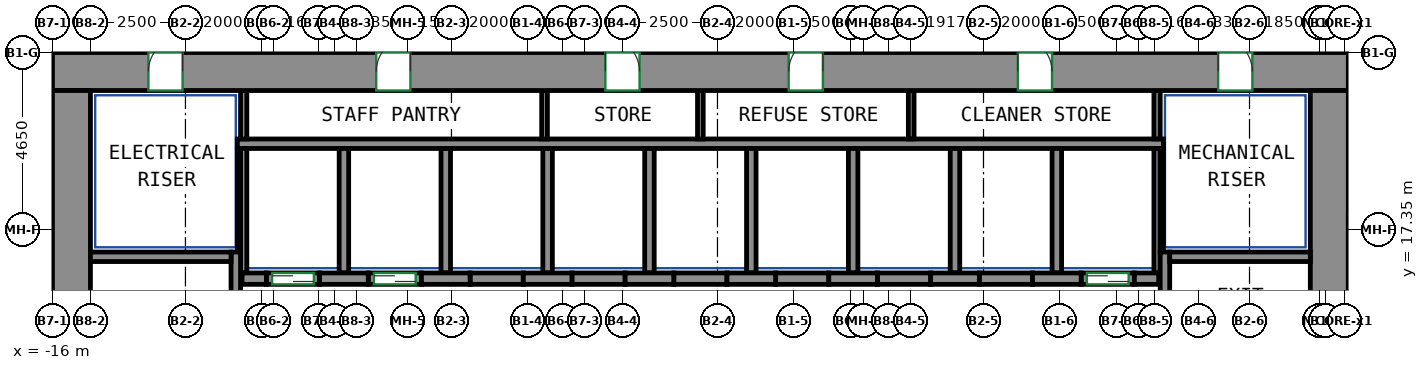
"""IFC4 building model, lengths in metres.
Left out: names, types, materials, properties, quantities, classifications, styles, units other than length and angle.
Written with IfcOpenShell. Run it as: python <this file> out.ifc"""

import sys

from ifc_helpers import new_model, si_unit, direction, frame, frame_2d, origin, place, context, subcontext, project, spatial, rectangle, extrude, source, transform, mapped, element, fill, save


model = new_model("IFC4")
c1 = context("Model", 3, precision=1e-05, world=origin(), true_north=direction((0.0, 1.0)))
c2 = subcontext(c1, "Body", "Model", "MODEL_VIEW")
j1 = project(units=[si_unit("LENGTHUNIT", "METRE"), si_unit("PLANEANGLEUNIT", "RADIAN")], contexts=[c1])
p1 = place(None, origin())
s1 = spatial("IfcSite", under=j1, at=p1, CompositionType="ELEMENT")
p2 = place(p1, origin())
s2 = spatial("IfcBuilding", under=s1, at=p2, CompositionType="ELEMENT")
p3 = place(p2, frame((0.0, 0.0, 79.2)))
s3 = spatial("IfcBuildingStorey", under=s2, at=p3, CompositionType="ELEMENT", Elevation=79.2)
m1 = source(origin(), c2, "Body", "SweptSolid", [
    extrude(rectangle(XDim=34.1, YDim=1.0, at=frame_2d((17.05, 0.0))), origin(), (0.0, 0.0, 1.0), 3.72),
])
p4 = place(p3, frame((-16.0, 21.5, 0.0), z_axis=(0.0, 0.0, 1.0), x_axis=(1.0, 0.0, 0.0)))
e1 = element("IfcWall", 1, at=p4, inside=s3, PredefinedType="SHEAR", context=c2, shape_type="MappedRepresentation", body=[
    mapped(m1, transform((0.0, 0.0, 0.0))),
])
p5 = place(p4, frame((8.52, 0.0, 0.0)))
e2 = element("IfcOpeningElement", 2, at=p5, cuts=e1, PredefinedType="OPENING", context=c2, shape_type="SweptSolid", body=[
    extrude(rectangle(XDim=0.9, YDim=2.1, at=frame_2d((0.45, 1.05))), frame((0.0, 0.51, 0.0), z_axis=(0.0, -1.0, 0.0), x_axis=(1.0, 0.0, 0.0)), (0.0, 0.0, 1.0), 1.02),
])
p6 = place(p4, frame((14.55, 0.0, 0.0)))
e3 = element("IfcOpeningElement", 3, at=p6, cuts=e1, PredefinedType="OPENING", context=c2, shape_type="SweptSolid", body=[
    extrude(rectangle(XDim=0.9, YDim=2.1, at=frame_2d((0.45, 1.05))), frame((0.0, 0.51, 0.0), z_axis=(0.0, -1.0, 0.0), x_axis=(1.0, 0.0, 0.0)), (0.0, 0.0, 1.0), 1.02),
])
p7 = place(p4, frame((19.374, 0.0, 0.0)))
e4 = element("IfcOpeningElement", 4, at=p7, cuts=e1, PredefinedType="OPENING", context=c2, shape_type="SweptSolid", body=[
    extrude(rectangle(XDim=0.9, YDim=2.1, at=frame_2d((0.45, 1.05))), frame((0.0, 0.51, 0.0), z_axis=(0.0, -1.0, 0.0), x_axis=(1.0, 0.0, 0.0)), (0.0, 0.0, 1.0), 1.02),
])
p8 = place(p4, frame((25.404, 0.0, 0.0)))
e5 = element("IfcOpeningElement", 5, at=p8, cuts=e1, PredefinedType="OPENING", context=c2, shape_type="SweptSolid", body=[
    extrude(rectangle(XDim=0.9, YDim=2.1, at=frame_2d((0.45, 1.05))), frame((0.0, 0.51, 0.0), z_axis=(0.0, -1.0, 0.0), x_axis=(1.0, 0.0, 0.0)), (0.0, 0.0, 1.0), 1.02),
])
p9 = place(p4, frame((2.525, 0.0, 0.0)))
e6 = element("IfcOpeningElement", 6, at=p9, cuts=e1, PredefinedType="OPENING", context=c2, shape_type="SweptSolid", body=[
    extrude(rectangle(XDim=0.9, YDim=2.1, at=frame_2d((0.45, 1.05))), frame((0.0, 0.51, 0.0), z_axis=(0.0, -1.0, 0.0), x_axis=(1.0, 0.0, 0.0)), (0.0, 0.0, 1.0), 1.02),
])
p10 = place(p4, frame((30.675, 0.0, 0.0)))
e7 = element("IfcOpeningElement", 7, at=p10, cuts=e1, PredefinedType="OPENING", context=c2, shape_type="SweptSolid", body=[
    extrude(rectangle(XDim=0.9, YDim=2.1, at=frame_2d((0.45, 1.05))), frame((0.0, 0.51, 0.0), z_axis=(0.0, -1.0, 0.0), x_axis=(1.0, 0.0, 0.0)), (0.0, 0.0, 1.0), 1.02),
])
m2 = source(origin(), c2, "Body", "SweptSolid", [
    extrude(rectangle(XDim=12.0, YDim=1.0, at=frame_2d((6.0, 0.0))), origin(), (0.0, 0.0, 1.0), 3.72),
])
for number, where, z_axis, x_axis in (
    (8, (-15.5, 9.0, 0.0), (0.0, 0.0, 1.0), (0.0, 1.0, 0.0)),
    (9, (17.6, 9.0, 0.0), (0.0, 0.0, 1.0), (0.0, 1.0, 0.0)),
):
    element("IfcWall", number, at=place(p3, frame(where, z_axis=z_axis, x_axis=x_axis)), inside=s3, PredefinedType="SHEAR", context=c2, shape_type="MappedRepresentation", body=[
        mapped(m2, transform((0.0, 0.0, 0.0))),
    ])
m3 = source(origin(), c2, "Body", "SweptSolid", [
    extrude(rectangle(XDim=7.75, YDim=0.25, at=frame_2d((3.875, 0.0))), origin(), (0.0, 0.0, 1.0), 3.72),
])
p11 = place(p3, frame((-11.175, 9.0, 0.0), z_axis=(0.0, 0.0, 1.0), x_axis=(0.0, 1.0, 0.0)))
e10 = element("IfcWall", 10, at=p11, inside=s3, PredefinedType="SHEAR", context=c2, shape_type="MappedRepresentation", body=[
    mapped(m3, transform((0.0, 0.0, 0.0))),
])
m4 = source(origin(), c2, "Body", "SweptSolid", [
    extrude(rectangle(XDim=3.7, YDim=0.25, at=frame_2d((1.85, 0.0))), origin(), (0.0, 0.0, 1.0), 3.72),
])
p12 = place(p3, frame((-15.0, 16.625, 0.0), z_axis=(0.0, 0.0, 1.0), x_axis=(1.0, 0.0, 0.0)))
e11 = element("IfcWall", 11, at=p12, inside=s3, PredefinedType="SHEAR", context=c2, shape_type="MappedRepresentation", body=[
    mapped(m4, transform((0.0, 0.0, 0.0))),
])
p13 = place(p3, frame((13.275, 9.0, 0.0), z_axis=(0.0, 0.0, 1.0), x_axis=(0.0, 1.0, 0.0)))
e12 = element("IfcWall", 12, at=p13, inside=s3, PredefinedType="SHEAR", context=c2, shape_type="MappedRepresentation", body=[
    mapped(m3, transform((0.0, 0.0, 0.0))),
])
m5 = source(origin(), c2, "Body", "SweptSolid", [
    extrude(rectangle(XDim=3.7, YDim=0.25, at=frame_2d((1.85, 0.0))), origin(), (0.0, 0.0, 1.0), 3.72),
])
p14 = place(p3, frame((13.4, 16.625, 0.0), z_axis=(0.0, 0.0, 1.0), x_axis=(1.0, 0.0, 0.0)))
e13 = element("IfcWall", 13, at=p14, inside=s3, PredefinedType="SHEAR", context=c2, shape_type="MappedRepresentation", body=[
    mapped(m5, transform((0.0, 0.0, 0.0))),
])
m6 = source(origin(), c2, "Body", "SweptSolid", [
    extrude(rectangle(XDim=0.64, YDim=0.3, at=frame_2d((0.32, 0.0))), origin(), (0.0, 0.0, 1.0), 3.72),
])
p15 = place(p3, frame((-11.01, 16.05, 0.0), z_axis=(0.0, 0.0, 1.0), x_axis=(1.0, 0.0, 0.0)))
e14 = element("IfcWall", 14, at=p15, inside=s3, PredefinedType="SHEAR", context=c2, shape_type="MappedRepresentation", body=[
    mapped(m6, transform((0.0, 0.0, 0.0))),
])
m7 = source(origin(), c2, "Body", "SweptSolid", [
    extrude(rectangle(XDim=1.28, YDim=0.3, at=frame_2d((0.64, 0.0))), origin(), (0.0, 0.0, 1.0), 3.72),
])
for number, where, z_axis, x_axis in (
    (15, (-8.97, 16.05, 0.0), (0.0, 0.0, 1.0), (1.0, 0.0, 0.0)),
    (16, (-6.29, 16.05, 0.0), (0.0, 0.0, 1.0), (1.0, 0.0, 0.0)),
    (17, (-3.61, 16.05, 0.0), (0.0, 0.0, 1.0), (1.0, 0.0, 0.0)),
    (18, (-0.93, 16.05, 0.0), (0.0, 0.0, 1.0), (1.0, 0.0, 0.0)),
    (19, (1.75, 16.05, 0.0), (0.0, 0.0, 1.0), (1.0, 0.0, 0.0)),
    (20, (4.43, 16.05, 0.0), (0.0, 0.0, 1.0), (1.0, 0.0, 0.0)),
):
    element("IfcWall", number, at=place(p3, frame(where, z_axis=z_axis, x_axis=x_axis)), inside=s3, PredefinedType="SHEAR", context=c2, shape_type="MappedRepresentation", body=[
        mapped(m7, transform((0.0, 0.0, 0.0))),
    ])
m8 = source(origin(), c2, "Body", "SweptSolid", [
    extrude(rectangle(XDim=1.28, YDim=0.3, at=frame_2d((0.64, 0.0))), origin(), (0.0, 0.0, 1.0), 3.72),
])
p16 = place(p3, frame((7.11, 16.05, 0.0), z_axis=(0.0, 0.0, 1.0), x_axis=(1.0, 0.0, 0.0)))
e21 = element("IfcWall", 21, at=p16, inside=s3, PredefinedType="SHEAR", context=c2, shape_type="MappedRepresentation", body=[
    mapped(m8, transform((0.0, 0.0, 0.0))),
])
p17 = place(p3, frame((9.79, 16.05, 0.0), z_axis=(0.0, 0.0, 1.0), x_axis=(1.0, 0.0, 0.0)))
e22 = element("IfcWall", 22, at=p17, inside=s3, PredefinedType="SHEAR", context=c2, shape_type="MappedRepresentation", body=[
    mapped(m7, transform((0.0, 0.0, 0.0))),
])
m9 = source(origin(), c2, "Body", "SweptSolid", [
    extrude(rectangle(XDim=0.64, YDim=0.3, at=frame_2d((0.32, 0.0))), origin(), (0.0, 0.0, 1.0), 3.72),
])
p18 = place(p3, frame((12.47, 16.05, 0.0), z_axis=(0.0, 0.0, 1.0), x_axis=(1.0, 0.0, 0.0)))
e23 = element("IfcWall", 23, at=p18, inside=s3, PredefinedType="SHEAR", context=c2, shape_type="MappedRepresentation", body=[
    mapped(m9, transform((0.0, 0.0, 0.0))),
])
m10 = source(origin(), c2, "Body", "SweptSolid", [
    extrude(rectangle(XDim=1.4, YDim=0.3, at=frame_2d((0.7, 0.0))), origin(), (0.0, 0.0, 1.0), 3.72),
])
p19 = place(p3, frame((11.07, 16.05, 0.0), z_axis=(0.0, 0.0, 1.0), x_axis=(1.0, 0.0, 0.0)))
e24 = element("IfcWall", 24, at=p19, inside=s3, PredefinedType="PARTITIONING", context=c2, shape_type="MappedRepresentation", body=[
    mapped(m10, transform((0.0, 0.0, 0.0))),
])
p20 = place(p19, frame((0.15, 0.0, 0.0)))
e25 = element("IfcOpeningElement", 25, at=p20, cuts=e24, PredefinedType="OPENING", context=c2, shape_type="SweptSolid", body=[
    extrude(rectangle(XDim=1.1, YDim=2.1, at=frame_2d((0.55, 1.05))), frame((0.0, 0.16, 0.0), z_axis=(0.0, -1.0, 0.0), x_axis=(1.0, 0.0, 0.0)), (0.0, 0.0, 1.0), 0.32),
])
m11 = source(origin(), c2, "Body", "SweptSolid", [
    extrude(rectangle(XDim=1.4, YDim=0.3, at=frame_2d((0.7, 0.0))), origin(), (0.0, 0.0, 1.0), 3.72),
])
p21 = place(p3, frame((-10.37, 16.05, 0.0), z_axis=(0.0, 0.0, 1.0), x_axis=(1.0, 0.0, 0.0)))
e26 = element("IfcWall", 26, at=p21, inside=s3, PredefinedType="PARTITIONING", context=c2, shape_type="MappedRepresentation", body=[
    mapped(m11, transform((0.0, 0.0, 0.0))),
])
p22 = place(p21, frame((0.15, 0.0, 0.0)))
e27 = element("IfcOpeningElement", 27, at=p22, cuts=e26, PredefinedType="OPENING", context=c2, shape_type="SweptSolid", body=[
    extrude(rectangle(XDim=1.1, YDim=2.1, at=frame_2d((0.55, 1.05))), frame((0.0, 0.16, 0.0), z_axis=(0.0, -1.0, 0.0), x_axis=(1.0, 0.0, 0.0)), (0.0, 0.0, 1.0), 0.32),
])
p23 = place(p3, frame((-7.69, 16.05, 0.0), z_axis=(0.0, 0.0, 1.0), x_axis=(1.0, 0.0, 0.0)))
e28 = element("IfcWall", 28, at=p23, inside=s3, PredefinedType="PARTITIONING", context=c2, shape_type="MappedRepresentation", body=[
    mapped(m10, transform((0.0, 0.0, 0.0))),
])
p24 = place(p23, frame((0.15, 0.0, 0.0)))
e29 = element("IfcOpeningElement", 29, at=p24, cuts=e28, PredefinedType="OPENING", context=c2, shape_type="SweptSolid", body=[
    extrude(rectangle(XDim=1.1, YDim=2.1, at=frame_2d((0.55, 1.05))), frame((0.0, 0.16, 0.0), z_axis=(0.0, -1.0, 0.0), x_axis=(1.0, 0.0, 0.0)), (0.0, 0.0, 1.0), 0.32),
])
p25 = place(p3, frame((-5.01, 16.05, 0.0), z_axis=(0.0, 0.0, 1.0), x_axis=(1.0, 0.0, 0.0)))
e30 = element("IfcWall", 30, at=p25, inside=s3, PredefinedType="PARTITIONING", context=c2, shape_type="MappedRepresentation", body=[
    mapped(m10, transform((0.0, 0.0, 0.0))),
])
p26 = place(p3, frame((-2.33, 16.05, 0.0), z_axis=(0.0, 0.0, 1.0), x_axis=(1.0, 0.0, 0.0)))
e31 = element("IfcWall", 31, at=p26, inside=s3, PredefinedType="PARTITIONING", context=c2, shape_type="MappedRepresentation", body=[
    mapped(m11, transform((0.0, 0.0, 0.0))),
])
for number, where, z_axis, x_axis in (
    (32, (0.35, 16.05, 0.0), (0.0, 0.0, 1.0), (1.0, 0.0, 0.0)),
    (33, (3.03, 16.05, 0.0), (0.0, 0.0, 1.0), (1.0, 0.0, 0.0)),
):
    element("IfcWall", number, at=place(p3, frame(where, z_axis=z_axis, x_axis=x_axis)), inside=s3, PredefinedType="PARTITIONING", context=c2, shape_type="MappedRepresentation", body=[
        mapped(m10, transform((0.0, 0.0, 0.0))),
    ])
for number, where, z_axis, x_axis in (
    (34, (5.71, 16.05, 0.0), (0.0, 0.0, 1.0), (1.0, 0.0, 0.0)),
    (35, (8.39, 16.05, 0.0), (0.0, 0.0, 1.0), (1.0, 0.0, 0.0)),
):
    element("IfcWall", number, at=place(p3, frame(where, z_axis=z_axis, x_axis=x_axis)), inside=s3, PredefinedType="PARTITIONING", context=c2, shape_type="MappedRepresentation", body=[
        mapped(m11, transform((0.0, 0.0, 0.0))),
    ])
m12 = source(origin(), c2, "Body", "SweptSolid", [
    extrude(rectangle(XDim=24.37, YDim=0.25, at=frame_2d((12.185, 0.0))), origin(), (0.0, 0.0, 1.0), 3.72),
])
p27 = place(p3, frame((-11.135, 19.6, 0.0), z_axis=(0.0, 0.0, 1.0), x_axis=(1.0, 0.0, 0.0)))
e36 = element("IfcWall", 36, at=p27, inside=s3, PredefinedType="PARTITIONING", context=c2, shape_type="MappedRepresentation", body=[
    mapped(m12, transform((0.0, 0.0, 0.0))),
])
m13 = source(origin(), c2, "Body", "SweptSolid", [
    extrude(rectangle(XDim=3.275, YDim=0.165, at=frame_2d((1.638, 0.0))), origin(), (0.0, 0.0, 1.0), 3.72),
])
p28 = place(p3, frame((13.067, 16.2, 0.0), z_axis=(0.0, 0.0, 1.0), x_axis=(0.0, 1.0, 0.0)))
e37 = element("IfcWall", 37, at=p28, inside=s3, PredefinedType="PARTITIONING", context=c2, shape_type="MappedRepresentation", body=[
    mapped(m13, transform((0.0, 0.0, 0.0))),
])
m14 = source(origin(), c2, "Body", "SweptSolid", [
    extrude(rectangle(XDim=1.275, YDim=0.165, at=frame_2d((0.637, 0.0))), origin(), (0.0, 0.0, 1.0), 3.72),
])
p29 = place(p3, frame((13.067, 19.725, 0.0), z_axis=(0.0, 0.0, 1.0), x_axis=(0.0, 1.0, 0.0)))
e38 = element("IfcWall", 38, at=p29, inside=s3, PredefinedType="PARTITIONING", context=c2, shape_type="MappedRepresentation", body=[
    mapped(m14, transform((0.0, 0.0, 0.0))),
])
p30 = place(p3, frame((-10.968, 16.2, 0.0), z_axis=(0.0, 0.0, 1.0), x_axis=(0.0, 1.0, 0.0)))
e39 = element("IfcWall", 39, at=p30, inside=s3, PredefinedType="PARTITIONING", context=c2, shape_type="MappedRepresentation", body=[
    mapped(m13, transform((0.0, 0.0, 0.0))),
])
p31 = place(p3, frame((-10.968, 19.725, 0.0), z_axis=(0.0, 0.0, 1.0), x_axis=(0.0, 1.0, 0.0)))
e40 = element("IfcWall", 40, at=p31, inside=s3, PredefinedType="PARTITIONING", context=c2, shape_type="MappedRepresentation", body=[
    mapped(m14, transform((0.0, 0.0, 0.0))),
])
m15 = source(origin(), c2, "Body", "SweptSolid", [
    extrude(rectangle(XDim=3.275, YDim=0.25, at=frame_2d((1.638, 0.0))), origin(), (0.0, 0.0, 1.0), 3.72),
])
p32 = place(p3, frame((10.43, 16.2, 0.0), z_axis=(0.0, 0.0, 1.0), x_axis=(0.0, 1.0, 0.0)))
e41 = element("IfcWall", 41, at=p32, inside=s3, PredefinedType="PARTITIONING", context=c2, shape_type="MappedRepresentation", body=[
    mapped(m15, transform((0.0, 0.0, 0.0))),
])
m16 = source(origin(), c2, "Body", "SweptSolid", [
    extrude(rectangle(XDim=2.725, YDim=0.085, at=frame_2d((1.363, 0.0))), origin(), (0.0, 0.0, 1.0), 3.72),
])
p33 = place(p3, frame((13.192, 16.75, 0.0), z_axis=(0.0, 0.0, 1.0), x_axis=(0.0, 1.0, 0.0)))
e42 = element("IfcWall", 42, at=p33, inside=s3, PredefinedType="PARTITIONING", context=c2, shape_type="MappedRepresentation", body=[
    mapped(m16, transform((0.0, 0.0, 0.0))),
])
for number, where, z_axis, x_axis in (
    (43, (2.39, 16.2, 0.0), (0.0, 0.0, 1.0), (0.0, 1.0, 0.0)),
    (44, (5.07, 16.2, 0.0), (0.0, 0.0, 1.0), (0.0, 1.0, 0.0)),
    (45, (7.75, 16.2, 0.0), (0.0, 0.0, 1.0), (0.0, 1.0, 0.0)),
    (46, (-0.29, 16.2, 0.0), (0.0, 0.0, 1.0), (0.0, 1.0, 0.0)),
):
    element("IfcWall", number, at=place(p3, frame(where, z_axis=z_axis, x_axis=x_axis)), inside=s3, PredefinedType="PARTITIONING", context=c2, shape_type="MappedRepresentation", body=[
        mapped(m15, transform((0.0, 0.0, 0.0))),
    ])
p34 = place(p3, frame((-11.093, 16.75, 0.0), z_axis=(0.0, 0.0, 1.0), x_axis=(0.0, 1.0, 0.0)))
e47 = element("IfcWall", 47, at=p34, inside=s3, PredefinedType="PARTITIONING", context=c2, shape_type="MappedRepresentation", body=[
    mapped(m16, transform((0.0, 0.0, 0.0))),
])
for number, where, z_axis, x_axis in (
    (48, (-2.97, 16.2, 0.0), (0.0, 0.0, 1.0), (0.0, 1.0, 0.0)),
    (49, (-5.65, 16.2, 0.0), (0.0, 0.0, 1.0), (0.0, 1.0, 0.0)),
    (50, (-8.33, 16.2, 0.0), (0.0, 0.0, 1.0), (0.0, 1.0, 0.0)),
):
    element("IfcWall", number, at=place(p3, frame(where, z_axis=z_axis, x_axis=x_axis)), inside=s3, PredefinedType="PARTITIONING", context=c2, shape_type="MappedRepresentation", body=[
        mapped(m15, transform((0.0, 0.0, 0.0))),
    ])
m17 = source(origin(), c2, "Body", "SweptSolid", [
    extrude(rectangle(XDim=1.275, YDim=0.15, at=frame_2d((0.637, 0.0))), origin(), (0.0, 0.0, 1.0), 3.72),
])
for number, where, z_axis, x_axis in (
    (51, (-3.05, 19.725, 0.0), (0.0, 0.0, 1.0), (0.0, 1.0, 0.0)),
    (52, (1.05, 19.725, 0.0), (0.0, 0.0, 1.0), (0.0, 1.0, 0.0)),
    (53, (6.598, 19.725, 0.0), (0.0, 0.0, 1.0), (0.0, 1.0, 0.0)),
):
    element("IfcWall", number, at=place(p3, frame(where, z_axis=z_axis, x_axis=x_axis)), inside=s3, PredefinedType="PARTITIONING", context=c2, shape_type="MappedRepresentation", body=[
        mapped(m17, transform((0.0, 0.0, 0.0))),
    ])
p35 = place(p20, origin())
e54 = element("IfcDoor", 54, at=p35, inside=s3, OperationType="DOUBLE_DOOR_SLIDING", PredefinedType="DOOR", context=c2, shape_type="SweptSolid", body=[
    extrude(rectangle(XDim=1.1, YDim=2.1, at=frame_2d((0.55, 1.05))), frame((0.0, 0.025, 0.0), z_axis=(0.0, -1.0, 0.0), x_axis=(1.0, 0.0, 0.0)), (0.0, 0.0, 1.0), 0.05),
])
fill(e25, e54)
p36 = place(p22, origin())
e55 = element("IfcDoor", 55, at=p36, inside=s3, OperationType="DOUBLE_DOOR_SLIDING", PredefinedType="DOOR", context=c2, shape_type="SweptSolid", body=[
    extrude(rectangle(XDim=1.1, YDim=2.1, at=frame_2d((0.55, 1.05))), frame((0.0, 0.025, 0.0), z_axis=(0.0, -1.0, 0.0), x_axis=(1.0, 0.0, 0.0)), (0.0, 0.0, 1.0), 0.05),
])
fill(e27, e55)
p37 = place(p24, origin())
e56 = element("IfcDoor", 56, at=p37, inside=s3, OperationType="DOUBLE_DOOR_SLIDING", PredefinedType="DOOR", context=c2, shape_type="SweptSolid", body=[
    extrude(rectangle(XDim=1.1, YDim=2.1, at=frame_2d((0.55, 1.05))), frame((0.0, 0.025, 0.0), z_axis=(0.0, -1.0, 0.0), x_axis=(1.0, 0.0, 0.0)), (0.0, 0.0, 1.0), 0.05),
])
fill(e29, e56)
p38 = place(p5, origin())
e57 = element("IfcDoor", 57, at=p38, inside=s3, OperationType="SINGLE_SWING_RIGHT", PredefinedType="DOOR", context=c2, shape_type="SweptSolid", body=[
    extrude(rectangle(XDim=0.9, YDim=2.1, at=frame_2d((0.45, 1.05))), frame((0.0, -0.355, 0.0), z_axis=(0.0, -1.0, 0.0), x_axis=(1.0, 0.0, 0.0)), (0.0, 0.0, 1.0), 0.05),
])
fill(e2, e57)
p39 = place(p6, origin())
e58 = element("IfcDoor", 58, at=p39, inside=s3, OperationType="SINGLE_SWING_LEFT", PredefinedType="DOOR", context=c2, shape_type="SweptSolid", body=[
    extrude(rectangle(XDim=0.9, YDim=2.1, at=frame_2d((0.45, 1.05))), frame((0.0, -0.355, 0.0), z_axis=(0.0, -1.0, 0.0), x_axis=(1.0, 0.0, 0.0)), (0.0, 0.0, 1.0), 0.05),
])
fill(e3, e58)
p40 = place(p7, origin())
e59 = element("IfcDoor", 59, at=p40, inside=s3, OperationType="SINGLE_SWING_RIGHT", PredefinedType="DOOR", context=c2, shape_type="SweptSolid", body=[
    extrude(rectangle(XDim=0.9, YDim=2.1, at=frame_2d((0.45, 1.05))), frame((0.0, -0.355, 0.0), z_axis=(0.0, -1.0, 0.0), x_axis=(1.0, 0.0, 0.0)), (0.0, 0.0, 1.0), 0.05),
])
fill(e4, e59)
p41 = place(p8, origin())
e60 = element("IfcDoor", 60, at=p41, inside=s3, OperationType="SINGLE_SWING_LEFT", PredefinedType="DOOR", context=c2, shape_type="SweptSolid", body=[
    extrude(rectangle(XDim=0.9, YDim=2.1, at=frame_2d((0.45, 1.05))), frame((0.0, -0.355, 0.0), z_axis=(0.0, -1.0, 0.0), x_axis=(1.0, 0.0, 0.0)), (0.0, 0.0, 1.0), 0.05),
])
fill(e5, e60)
p42 = place(p9, origin())
e61 = element("IfcDoor", 61, at=p42, inside=s3, OperationType="SINGLE_SWING_RIGHT", PredefinedType="DOOR", context=c2, shape_type="SweptSolid", body=[
    extrude(rectangle(XDim=0.9, YDim=2.1, at=frame_2d((0.45, 1.05))), frame((0.0, -0.355, 0.0), z_axis=(0.0, -1.0, 0.0), x_axis=(1.0, 0.0, 0.0)), (0.0, 0.0, 1.0), 0.05),
])
fill(e6, e61)
p43 = place(p10, origin())
e62 = element("IfcDoor", 62, at=p43, inside=s3, OperationType="SINGLE_SWING_LEFT", PredefinedType="DOOR", context=c2, shape_type="SweptSolid", body=[
    extrude(rectangle(XDim=0.9, YDim=2.1, at=frame_2d((0.45, 1.05))), frame((0.0, -0.355, 0.0), z_axis=(0.0, -1.0, 0.0), x_axis=(1.0, 0.0, 0.0)), (0.0, 0.0, 1.0), 0.05),
])
fill(e7, e62)
save(model, sys.argv[1])
